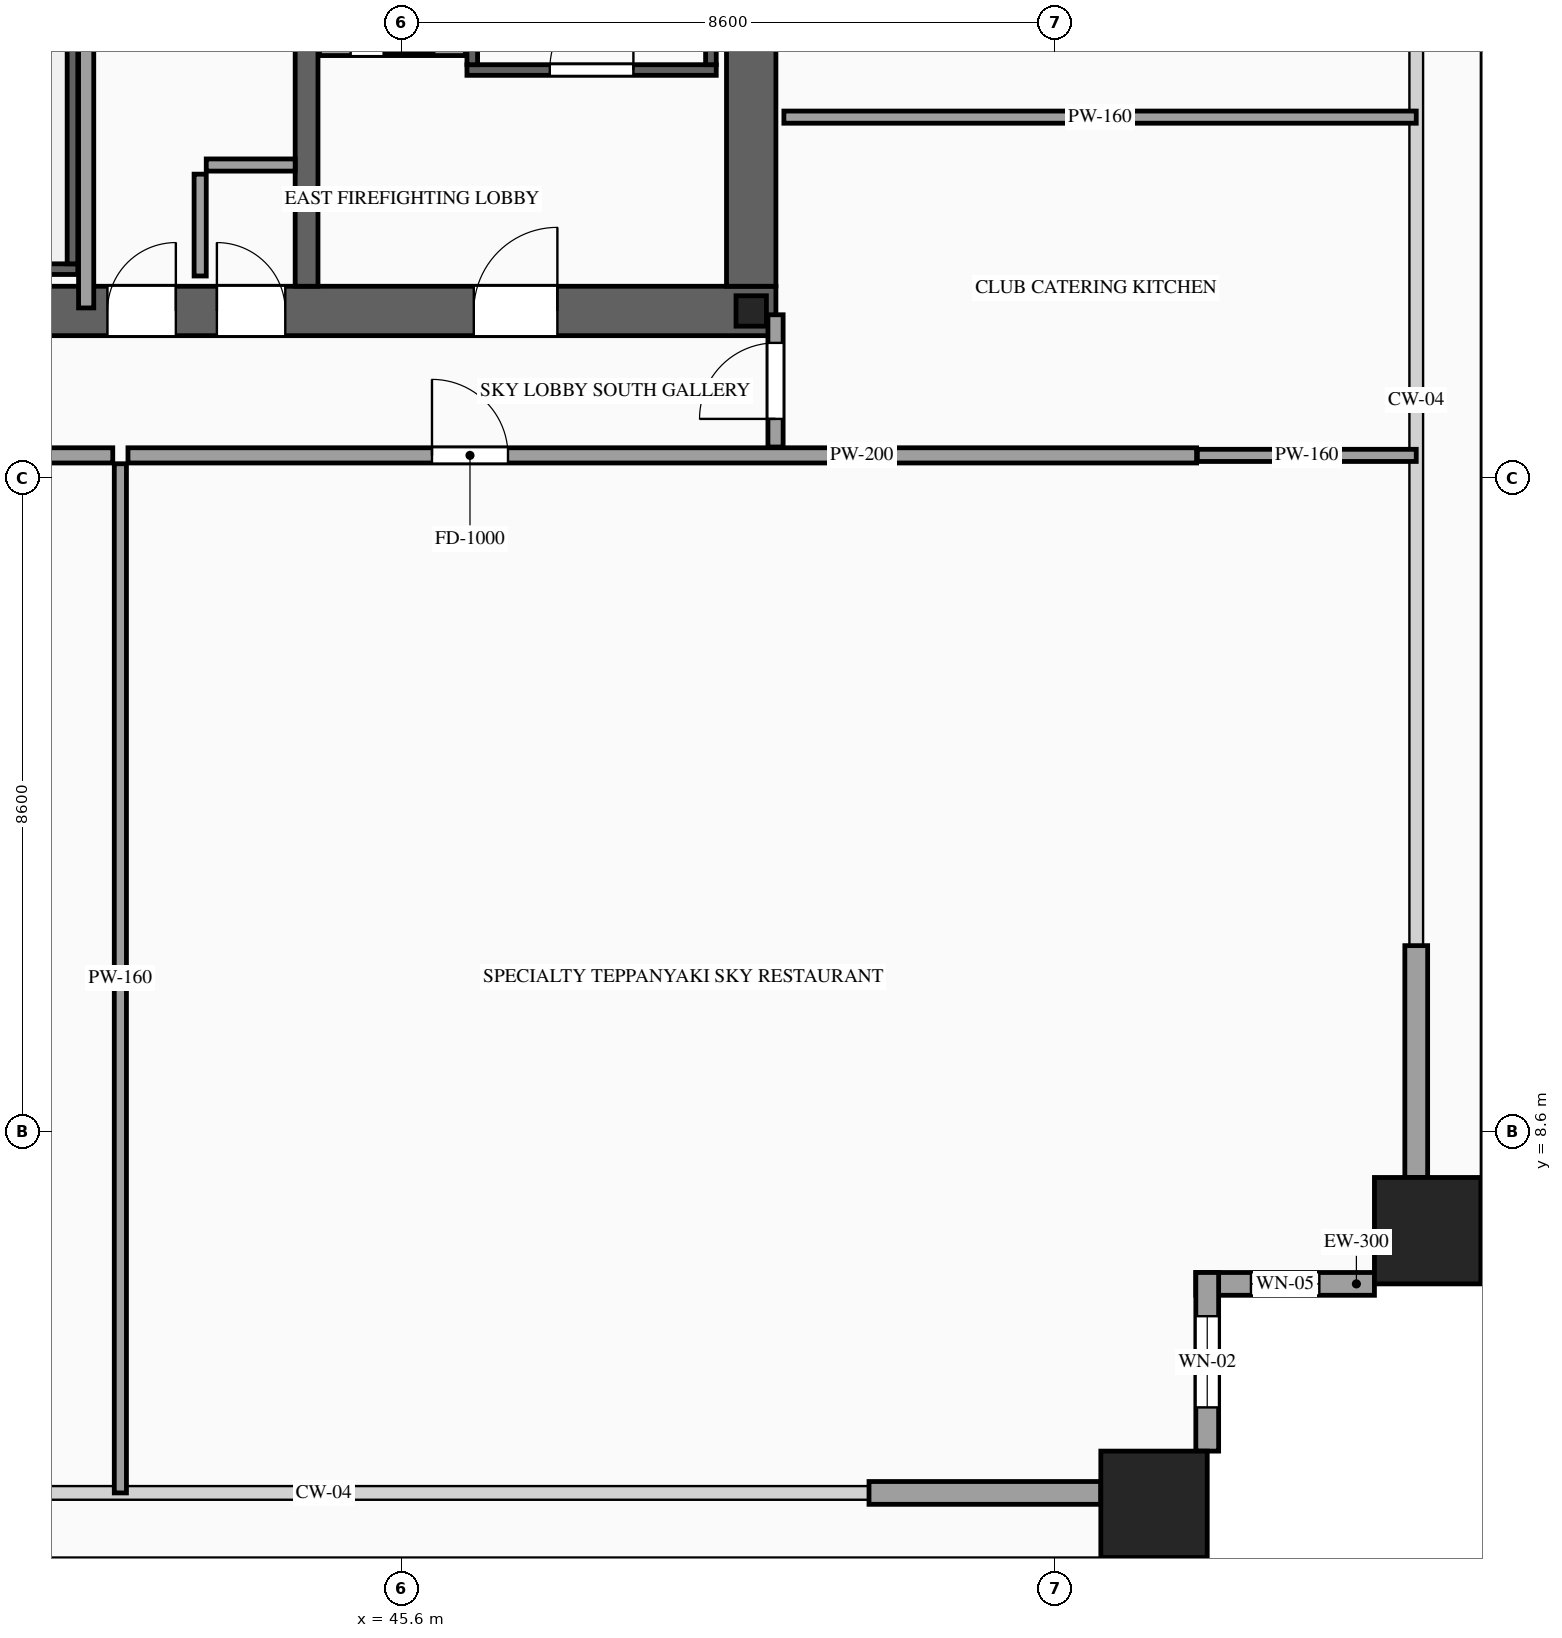
"""IFC4 building model, lengths in metres.
Left out: names, types, materials, properties, quantities, classifications, styles, units other than length and angle.
Written with IfcOpenShell. Run it as: python <this file> out.ifc"""

import sys

from ifc_helpers import new_model, si_unit, direction, frame, frame_2d, origin, origin_2d, place, context, subcontext, project, spatial, rectangle, hollow_rectangle, i_section, extrude, source, transform, mapped, element, fill, save


model = new_model("IFC4")
c1 = context("Model", 3, precision=1e-05, world=origin(), true_north=direction((0.0, 1.0)))
c2 = subcontext(c1, "Body", "Model", "MODEL_VIEW")
j1 = project(units=[si_unit("LENGTHUNIT", "METRE"), si_unit("PLANEANGLEUNIT", "RADIAN")], contexts=[c1])
p1 = place(None, origin())
s1 = spatial("IfcSite", under=j1, at=p1, CompositionType="ELEMENT")
p2 = place(p1, origin())
s2 = spatial("IfcBuilding", under=s1, at=p2, CompositionType="ELEMENT")
p3 = place(p2, frame((0.0, 0.0, 171.6)))
s3 = spatial("IfcBuildingStorey", under=s2, at=p3, CompositionType="ELEMENT", Elevation=171.6)
p4 = place(p3, frame((23.475, 19.4, 0.0), z_axis=(0.0, 0.0, 1.0), x_axis=(1.0, 0.0, 0.0)))
e1 = element("IfcWall", 1, at=p4, inside=s3, PredefinedType="SHEAR", context=c2, shape_type="SweptSolid", body=[
    extrude(rectangle(XDim=27.05, YDim=0.65, at=frame_2d((13.525, 0.0))), origin(), (0.0, 0.0, 1.0), 4.8),
])
p5 = place(p4, frame((1.975, 0.0, 0.0)))
e2 = element("IfcOpeningElement", 2, at=p5, cuts=e1, PredefinedType="OPENING", context=c2, shape_type="SweptSolid", body=[
    extrude(rectangle(XDim=1.1, YDim=2.2, at=frame_2d((0.55, 1.1))), frame((0.0, 0.34, 0.0), z_axis=(0.0, -1.0, 0.0), x_axis=(1.0, 0.0, 0.0)), (0.0, 0.0, 1.0), 0.68),
])
p6 = place(p4, frame((9.875, 0.0, 0.0)))
e3 = element("IfcOpeningElement", 3, at=p6, cuts=e1, PredefinedType="OPENING", context=c2, shape_type="SweptSolid", body=[
    extrude(rectangle(XDim=1.1, YDim=2.2, at=frame_2d((0.55, 1.1))), frame((0.0, 0.34, 0.0), z_axis=(0.0, -1.0, 0.0), x_axis=(1.0, 0.0, 0.0)), (0.0, 0.0, 1.0), 0.68),
])
p7 = place(p4, frame((23.075, 0.0, 0.0)))
e4 = element("IfcOpeningElement", 4, at=p7, cuts=e1, PredefinedType="OPENING", context=c2, shape_type="SweptSolid", body=[
    extrude(rectangle(XDim=1.1, YDim=2.2, at=frame_2d((0.55, 1.1))), frame((0.0, 0.34, 0.0), z_axis=(0.0, -1.0, 0.0), x_axis=(1.0, 0.0, 0.0)), (0.0, 0.0, 1.0), 0.68),
])
p8 = place(p4, frame((19.695, 0.0, 0.0)))
e5 = element("IfcOpeningElement", 5, at=p8, cuts=e1, PredefinedType="OPENING", context=c2, shape_type="SweptSolid", body=[
    extrude(rectangle(XDim=0.9, YDim=2.15, at=frame_2d((0.45, 1.075))), frame((0.0, 0.34, 0.0), z_axis=(0.0, -1.0, 0.0), x_axis=(1.0, 0.0, 0.0)), (0.0, 0.0, 1.0), 0.68),
])
p9 = place(p4, frame((18.255, 0.0, 0.0)))
e6 = element("IfcOpeningElement", 6, at=p9, cuts=e1, PredefinedType="OPENING", context=c2, shape_type="SweptSolid", body=[
    extrude(rectangle(XDim=0.9, YDim=2.15, at=frame_2d((0.45, 1.075))), frame((0.0, 0.34, 0.0), z_axis=(0.0, -1.0, 0.0), x_axis=(1.0, 0.0, 0.0)), (0.0, 0.0, 1.0), 0.68),
])
m1 = source(origin(), c2, "Body", "SweptSolid", [
    extrude(rectangle(XDim=12.15, YDim=0.65, at=frame_2d((6.075, 0.0))), origin(), (0.0, 0.0, 1.0), 4.8),
])
p10 = place(p3, frame((50.2, 19.725, 0.0), z_axis=(0.0, 0.0, 1.0), x_axis=(0.0, 1.0, 0.0)))
e7 = element("IfcWall", 7, at=p10, inside=s3, PredefinedType="SHEAR", context=c2, shape_type="MappedRepresentation", body=[
    mapped(m1, transform((0.0, 0.0, 0.0), scale=1.0)),
])
m2 = source(origin(), c2, "Body", "SweptSolid", [
    extrude(rectangle(XDim=12.15, YDim=0.3, at=frame_2d((6.075, 0.0))), origin(), (0.0, 0.0, 1.0), 4.8),
])
p11 = place(p3, frame((44.35, 19.725, 0.0), z_axis=(0.0, 0.0, 1.0), x_axis=(0.0, 1.0, 0.0)))
e8 = element("IfcWall", 8, at=p11, inside=s3, PredefinedType="SOLIDWALL", context=c2, shape_type="MappedRepresentation", body=[
    mapped(m2, transform((0.0, 0.0, 0.0), scale=1.0)),
])
m3 = source(origin(), c2, "Body", "SweptSolid", [
    extrude(i_section(OverallWidth=0.4, OverallDepth=0.4, WebThickness=0.013, FlangeThickness=0.021, at=origin_2d()), origin(), (0.0, 0.0, 1.0), 4.8),
])
p12 = place(p3, frame((50.2, 19.4, 0.0), z_axis=(0.0, 0.0, 1.0), x_axis=(1.0, 0.0, 0.0)))
e9 = element("IfcColumn", 9, at=p12, inside=s3, PredefinedType="COLUMN", context=c2, shape_type="MappedRepresentation", body=[
    mapped(m3, transform((0.0, 0.0, 0.0), scale=1.0)),
])
m4 = source(origin(), c2, "Body", "SweptSolid", [
    extrude(hollow_rectangle(XDim=1.4, YDim=1.4, WallThickness=0.06, at=origin_2d()), origin(), (0.0, 0.0, 1.0), 4.8),
])
for number, where, z_axis, x_axis in (
    (10, (55.5, 3.7, 0.0), (0.0, 0.0, 1.0), (1.0, 0.0, 0.0)),
    (11, (59.1, 7.3, 0.0), (0.0, 0.0, 1.0), (1.0, 0.0, 0.0)),
):
    element("IfcColumn", number, at=place(p3, frame(where, z_axis=z_axis, x_axis=x_axis)), inside=s3, PredefinedType="COLUMN", context=c2, shape_type="MappedRepresentation", body=[
        mapped(m4, transform((0.0, 0.0, 0.0), scale=1.0)),
    ])
p13 = place(p3, frame((56.05, 6.6, 0.0), z_axis=(0.0, 0.0, 1.0), x_axis=(1.0, 0.0, 0.0)))
e12 = element("IfcWall", 12, at=p13, inside=s3, PredefinedType="SOLIDWALL", context=c2, shape_type="SweptSolid", body=[
    extrude(rectangle(XDim=2.35, YDim=0.3, at=frame_2d((1.175, 0.0))), origin(), (0.0, 0.0, 1.0), 4.52),
])
p14 = place(p13, frame((0.725, 0.0, 0.85)))
e13 = element("IfcOpeningElement", 13, at=p14, cuts=e12, PredefinedType="OPENING", context=c2, shape_type="SweptSolid", body=[
    extrude(rectangle(XDim=0.9, YDim=1.5, at=frame_2d((0.45, 0.75))), frame((0.0, 0.165, 0.0), z_axis=(0.0, -1.0, 0.0), x_axis=(1.0, 0.0, 0.0)), (0.0, 0.0, 1.0), 0.33),
])
p15 = place(p3, frame((56.2, 4.4, 0.0), z_axis=(0.0, 0.0, 1.0), x_axis=(0.0, 1.0, 0.0)))
e14 = element("IfcWall", 14, at=p15, inside=s3, PredefinedType="SOLIDWALL", context=c2, shape_type="SweptSolid", body=[
    extrude(rectangle(XDim=2.35, YDim=0.3, at=frame_2d((1.175, 0.0))), origin(), (0.0, 0.0, 1.0), 4.52),
])
p16 = place(p15, frame((0.575, 0.0, 0.85)))
e15 = element("IfcOpeningElement", 15, at=p16, cuts=e14, PredefinedType="OPENING", context=c2, shape_type="SweptSolid", body=[
    extrude(rectangle(XDim=1.2, YDim=2.1, at=frame_2d((0.6, 1.05))), frame((0.0, 0.165, 0.0), z_axis=(0.0, -1.0, 0.0), x_axis=(1.0, 0.0, 0.0)), (0.0, 0.0, 1.0), 0.33),
])
m5 = source(origin(), c2, "Body", "SweptSolid", [
    extrude(rectangle(XDim=3.05, YDim=0.3, at=frame_2d((1.525, 0.0))), origin(), (0.0, 0.0, 1.0), 4.075),
])
for number, where, z_axis, x_axis in (
    (16, (51.75, 3.85, 0.0), (0.0, 0.0, 1.0), (1.0, 0.0, 0.0)),
    (17, (58.95, 8.0, 0.0), (0.0, 0.0, 1.0), (0.0, 1.0, 0.0)),
):
    element("IfcWall", number, at=place(p3, frame(where, z_axis=z_axis, x_axis=x_axis)), inside=s3, PredefinedType="SOLIDWALL", context=c2, shape_type="MappedRepresentation", body=[
        mapped(m5, transform((0.0, 0.0, 0.0), scale=1.0)),
    ])
p17 = place(p3, frame((44.52, 22.83, 0.0), z_axis=(0.0, 0.0, 1.0), x_axis=(1.0, 0.0, 0.0)))
e18 = element("IfcWall", 18, at=p17, inside=s3, PredefinedType="SOLIDWALL", context=c2, shape_type="SweptSolid", body=[
    extrude(rectangle(XDim=1.92, YDim=0.14, at=frame_2d((0.96, 0.0))), origin(), (0.0, 0.0, 1.0), 4.52),
])
p18 = place(p17, frame((0.41, 0.0, 0.0)))
e19 = element("IfcOpeningElement", 19, at=p18, cuts=e18, PredefinedType="OPENING", context=c2, shape_type="SweptSolid", body=[
    extrude(rectangle(XDim=1.1, YDim=2.2, at=frame_2d((0.55, 1.1))), frame((0.0, 0.085, 0.0), z_axis=(0.0, -1.0, 0.0), x_axis=(1.0, 0.0, 0.0)), (0.0, 0.0, 1.0), 0.17),
])
p19 = place(p3, frame((46.46, 22.57, 0.0), z_axis=(0.0, 0.0, 1.0), x_axis=(1.0, 0.0, 0.0)))
e20 = element("IfcWall", 20, at=p19, inside=s3, PredefinedType="SOLIDWALL", context=c2, shape_type="SweptSolid", body=[
    extrude(rectangle(XDim=3.28, YDim=0.14, at=frame_2d((1.64, 0.0))), origin(), (0.0, 0.0, 1.0), 4.52),
])
p20 = place(p19, frame((1.09, 0.0, 0.0)))
e21 = element("IfcOpeningElement", 21, at=p20, cuts=e20, PredefinedType="OPENING", context=c2, shape_type="SweptSolid", body=[
    extrude(rectangle(XDim=1.1, YDim=2.2, at=frame_2d((0.55, 1.1))), frame((0.0, 0.085, 0.0), z_axis=(0.0, -1.0, 0.0), x_axis=(1.0, 0.0, 0.0)), (0.0, 0.0, 1.0), 0.17),
])
m6 = source(origin(), c2, "Body", "SweptSolid", [
    extrude(rectangle(XDim=8.94, YDim=0.14, at=frame_2d((4.47, 0.0))), origin(), (0.0, 0.0, 1.0), 4.52),
])
for number, where, z_axis, x_axis in (
    (22, (46.53, 22.64, 0.0), (0.0, 0.0, 1.0), (0.0, 1.0, 0.0)),
    (23, (49.67, 22.64, 0.0), (0.0, 0.0, 1.0), (0.0, 1.0, 0.0)),
):
    element("IfcWall", number, at=place(p3, frame(where, z_axis=z_axis, x_axis=x_axis)), inside=s3, PredefinedType="SOLIDWALL", context=c2, shape_type="MappedRepresentation", body=[
        mapped(m6, transform((0.0, 0.0, 0.0), scale=1.0)),
    ])
m7 = source(origin(), c2, "Body", "SweptSolid", [
    extrude(rectangle(XDim=3.14, YDim=0.14, at=frame_2d((1.57, 0.0))), origin(), (0.0, 0.0, 1.0), 4.52),
])
p21 = place(p3, frame((38.2, 19.95, 0.0), z_axis=(0.0, 0.0, 1.0), x_axis=(1.0, 0.0, 0.0)))
e24 = element("IfcWall", 24, at=p21, inside=s3, PredefinedType="SOLIDWALL", context=c2, shape_type="MappedRepresentation", body=[
    mapped(m7, transform((0.0, 0.0, 0.0), scale=1.0)),
])
m8 = source(origin(), c2, "Body", "SweptSolid", [
    extrude(rectangle(XDim=8.94, YDim=0.14, at=frame_2d((4.47, 0.0))), origin(), (0.0, 0.0, 1.0), 4.52),
])
p22 = place(p3, frame((41.27, 20.02, 0.0), z_axis=(0.0, 0.0, 1.0), x_axis=(0.0, 1.0, 0.0)))
e25 = element("IfcWall", 25, at=p22, inside=s3, PredefinedType="SOLIDWALL", context=c2, shape_type="MappedRepresentation", body=[
    mapped(m8, transform((0.0, 0.0, 0.0), scale=1.0)),
])
m9 = source(origin(), c2, "Body", "SweptSolid", [
    extrude(rectangle(XDim=1.34, YDim=0.16, at=frame_2d((0.67, 0.0))), origin(), (0.0, 0.0, 1.0), 4.52),
])
p23 = place(p3, frame((42.95, 19.86, 0.0), z_axis=(0.0, 0.0, 1.0), x_axis=(0.0, 1.0, 0.0)))
e26 = element("IfcWall", 26, at=p23, inside=s3, PredefinedType="PARTITIONING", context=c2, shape_type="MappedRepresentation", body=[
    mapped(m9, transform((0.0, 0.0, 0.0), scale=1.0)),
])
m10 = source(origin(), c2, "Body", "SweptSolid", [
    extrude(rectangle(XDim=1.17, YDim=0.16, at=frame_2d((0.585, 0.0))), origin(), (0.0, 0.0, 1.0), 4.52),
])
p24 = place(p3, frame((43.03, 21.32, 0.0), z_axis=(0.0, 0.0, 1.0), x_axis=(1.0, 0.0, 0.0)))
e27 = element("IfcWall", 27, at=p24, inside=s3, PredefinedType="PARTITIONING", context=c2, shape_type="MappedRepresentation", body=[
    mapped(m10, transform((0.0, 0.0, 0.0), scale=1.0)),
])
m11 = source(origin(), c2, "Body", "SweptSolid", [
    extrude(rectangle(XDim=12.72, YDim=0.2, at=frame_2d((6.36, 0.0))), origin(), (0.0, 0.0, 1.0), 4.52),
])
p25 = place(p3, frame((41.45, 19.44, 0.0), z_axis=(0.0, 0.0, 1.0), x_axis=(0.0, 1.0, 0.0)))
e28 = element("IfcWall", 28, at=p25, inside=s3, PredefinedType="PARTITIONING", context=c2, shape_type="MappedRepresentation", body=[
    mapped(m11, transform((0.0, 0.0, 0.0), scale=1.0)),
])
p26 = place(p3, frame((32.0, 17.5, 0.0), z_axis=(0.0, 0.0, 1.0), x_axis=(1.0, 0.0, 0.0)))
e29 = element("IfcWall", 29, at=p26, inside=s3, PredefinedType="PARTITIONING", context=c2, shape_type="SweptSolid", body=[
    extrude(rectangle(XDim=9.8, YDim=0.2, at=frame_2d((4.9, 0.0))), origin(), (0.0, 0.0, 1.0), 4.52),
])
p27 = place(p26, frame((4.4, 0.0, 0.0)))
e30 = element("IfcOpeningElement", 30, at=p27, cuts=e29, PredefinedType="OPENING", context=c2, shape_type="SweptSolid", body=[
    extrude(rectangle(XDim=1.0, YDim=2.2, at=frame_2d((0.5, 1.1))), frame((0.0, 0.115, 0.0), z_axis=(0.0, -1.0, 0.0), x_axis=(1.0, 0.0, 0.0)), (0.0, 0.0, 1.0), 0.23),
])
m12 = source(origin(), c2, "Body", "SweptSolid", [
    extrude(rectangle(XDim=13.54, YDim=0.16, at=frame_2d((6.77, 0.0))), origin(), (0.0, 0.0, 1.0), 4.52),
])
p28 = place(p3, frame((41.9, 3.85, 0.0), z_axis=(0.0, 0.0, 1.0), x_axis=(0.0, 1.0, 0.0)))
e31 = element("IfcWall", 31, at=p28, inside=s3, PredefinedType="PARTITIONING", context=c2, shape_type="MappedRepresentation", body=[
    mapped(m12, transform((0.0, 0.0, 0.0), scale=1.0)),
])
p29 = place(p3, frame((42.0, 17.5, 0.0), z_axis=(0.0, 0.0, 1.0), x_axis=(1.0, 0.0, 0.0)))
e32 = element("IfcWall", 32, at=p29, inside=s3, PredefinedType="PARTITIONING", context=c2, shape_type="SweptSolid", body=[
    extrude(rectangle(XDim=14.06, YDim=0.2, at=frame_2d((7.03, 0.0))), origin(), (0.0, 0.0, 1.0), 4.52),
])
p30 = place(p29, frame((4.0, 0.0, 0.0)))
e33 = element("IfcOpeningElement", 33, at=p30, cuts=e32, PredefinedType="OPENING", context=c2, shape_type="SweptSolid", body=[
    extrude(rectangle(XDim=1.0, YDim=2.2, at=frame_2d((0.5, 1.1))), frame((0.0, 0.115, 0.0), z_axis=(0.0, -1.0, 0.0), x_axis=(1.0, 0.0, 0.0)), (0.0, 0.0, 1.0), 0.23),
])
p31 = place(p3, frame((50.52, 17.61, 0.0), z_axis=(0.0, 0.0, 1.0), x_axis=(0.0, 1.0, 0.0)))
e34 = element("IfcWall", 34, at=p31, inside=s3, PredefinedType="PARTITIONING", context=c2, shape_type="SweptSolid", body=[
    extrude(rectangle(XDim=1.74, YDim=0.2, at=frame_2d((0.87, 0.0))), origin(), (0.0, 0.0, 1.0), 4.52),
])
p32 = place(p31, frame((0.37, 0.0, 0.0)))
e35 = element("IfcOpeningElement", 35, at=p32, cuts=e34, PredefinedType="OPENING", context=c2, shape_type="SweptSolid", body=[
    extrude(rectangle(XDim=1.0, YDim=2.2, at=frame_2d((0.5, 1.1))), frame((0.0, 0.115, 0.0), z_axis=(0.0, -1.0, 0.0), x_axis=(1.0, 0.0, 0.0)), (0.0, 0.0, 1.0), 0.23),
])
m13 = source(origin(), c2, "Body", "SweptSolid", [
    extrude(rectangle(XDim=2.88, YDim=0.16, at=frame_2d((1.44, 0.0))), origin(), (0.0, 0.0, 1.0), 4.52),
])
p33 = place(p3, frame((56.07, 17.5, 0.0), z_axis=(0.0, 0.0, 1.0), x_axis=(1.0, 0.0, 0.0)))
e36 = element("IfcWall", 36, at=p33, inside=s3, PredefinedType="PARTITIONING", context=c2, shape_type="MappedRepresentation", body=[
    mapped(m13, transform((0.0, 0.0, 0.0), scale=1.0)),
])
m14 = source(origin(), c2, "Body", "SweptSolid", [
    extrude(rectangle(XDim=8.32, YDim=0.16, at=frame_2d((4.16, 0.0))), origin(), (0.0, 0.0, 1.0), 4.52),
])
p34 = place(p3, frame((50.63, 21.95, 0.0), z_axis=(0.0, 0.0, 1.0), x_axis=(1.0, 0.0, 0.0)))
e37 = element("IfcWall", 37, at=p34, inside=s3, PredefinedType="PARTITIONING", context=c2, shape_type="MappedRepresentation", body=[
    mapped(m14, transform((0.0, 0.0, 0.0), scale=1.0)),
])
m15 = source(origin(), c2, "Body", "SweptSolid", [
    extrude(rectangle(XDim=0.9, YDim=1.5, at=frame_2d((0.45, 0.75))), frame((0.0, 0.03, 0.0), z_axis=(0.0, -1.0, 0.0), x_axis=(1.0, 0.0, 0.0)), (0.0, 0.0, 1.0), 0.06),
])
p35 = place(p14, origin())
e38 = element("IfcWindow", 38, at=p35, inside=s3, PartitioningType="SINGLE_PANEL", PredefinedType="WINDOW", context=c2, shape_type="MappedRepresentation", body=[
    mapped(m15, transform((0.0, 0.0, 0.0), scale=1.0)),
])
fill(e13, e38)
m16 = source(origin(), c2, "Body", "SweptSolid", [
    extrude(rectangle(XDim=1.2, YDim=2.1, at=frame_2d((0.6, 1.05))), frame((0.0, 0.03, 0.0), z_axis=(0.0, -1.0, 0.0), x_axis=(1.0, 0.0, 0.0)), (0.0, 0.0, 1.0), 0.06),
])
p36 = place(p16, origin())
e39 = element("IfcWindow", 39, at=p36, inside=s3, PartitioningType="SINGLE_PANEL", PredefinedType="WINDOW", context=c2, shape_type="MappedRepresentation", body=[
    mapped(m16, transform((0.0, 0.0, 0.0), scale=1.0)),
])
fill(e15, e39)
m17 = source(origin(), c2, "Body", "SweptSolid", [
    extrude(rectangle(XDim=1.1, YDim=2.2, at=frame_2d((0.55, 1.1))), frame((0.0, 0.025, 0.0), z_axis=(0.0, -1.0, 0.0), x_axis=(1.0, 0.0, 0.0)), (0.0, 0.0, 1.0), 0.05),
])
p37 = place(p20, origin())
e40 = element("IfcDoor", 40, at=p37, inside=s3, OperationType="SINGLE_SWING_RIGHT", PredefinedType="DOOR", context=c2, shape_type="MappedRepresentation", body=[
    mapped(m17, transform((0.0, 0.0, 0.0), scale=1.0)),
])
fill(e21, e40)
p38 = place(p7, origin())
e41 = element("IfcDoor", 41, at=p38, inside=s3, OperationType="SINGLE_SWING_RIGHT", PredefinedType="DOOR", context=c2, shape_type="MappedRepresentation", body=[
    mapped(m17, transform((0.0, 0.0, 0.0), scale=1.0)),
])
fill(e4, e41)
m18 = source(origin(), c2, "Body", "SweptSolid", [
    extrude(rectangle(XDim=0.9, YDim=2.15, at=frame_2d((0.45, 1.075))), frame((0.0, 0.025, 0.0), z_axis=(0.0, -1.0, 0.0), x_axis=(1.0, 0.0, 0.0)), (0.0, 0.0, 1.0), 0.05),
])
p39 = place(p8, origin())
e42 = element("IfcDoor", 42, at=p39, inside=s3, OperationType="SINGLE_SWING_LEFT", PredefinedType="DOOR", context=c2, shape_type="MappedRepresentation", body=[
    mapped(m18, transform((0.0, 0.0, 0.0), scale=1.0)),
])
fill(e5, e42)
p40 = place(p9, origin())
e43 = element("IfcDoor", 43, at=p40, inside=s3, OperationType="SINGLE_SWING_RIGHT", PredefinedType="DOOR", context=c2, shape_type="MappedRepresentation", body=[
    mapped(m18, transform((0.0, 0.0, 0.0), scale=1.0)),
])
fill(e6, e43)
m19 = source(origin(), c2, "Body", "SweptSolid", [
    extrude(rectangle(XDim=1.0, YDim=2.2, at=frame_2d((0.5, 1.1))), frame((0.0, 0.025, 0.0), z_axis=(0.0, -1.0, 0.0), x_axis=(1.0, 0.0, 0.0)), (0.0, 0.0, 1.0), 0.05),
])
p41 = place(p30, origin())
e44 = element("IfcDoor", 44, at=p41, inside=s3, OperationType="SINGLE_SWING_LEFT", PredefinedType="DOOR", context=c2, shape_type="MappedRepresentation", body=[
    mapped(m19, transform((0.0, 0.0, 0.0), scale=1.0)),
])
fill(e33, e44)
p42 = place(p32, origin())
e45 = element("IfcDoor", 45, at=p42, inside=s3, OperationType="SINGLE_SWING_LEFT", PredefinedType="DOOR", context=c2, shape_type="MappedRepresentation", body=[
    mapped(m19, transform((0.0, 0.0, 0.0), scale=1.0)),
])
fill(e35, e45)
save(model, sys.argv[1])
